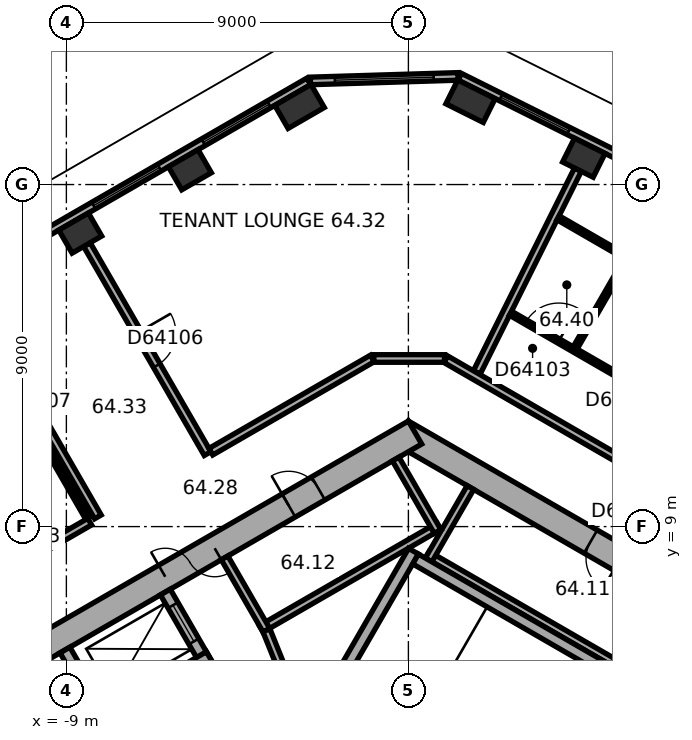
"""IFC4 building model, lengths in metres.
Left out: names, types, materials, properties, quantities, classifications, styles, units other than length and angle.
Written with IfcOpenShell. Run it as: python <this file> out.ifc"""

import sys

from ifc_helpers import new_model, si_unit, direction, frame, frame_2d, origin, origin_2d, place, context, subcontext, project, spatial, rectangle, extrude, element, fill, save


model = new_model("IFC4")
c1 = context("Model", 3, precision=1e-05, world=origin(), true_north=direction((0.0, 1.0)))
c2 = subcontext(c1, "Body", "Model", "MODEL_VIEW")
j1 = project(units=[si_unit("LENGTHUNIT", "METRE"), si_unit("PLANEANGLEUNIT", "RADIAN")], contexts=[c1])
p1 = place(None, origin())
s1 = spatial("IfcSite", under=j1, at=p1, CompositionType="ELEMENT")
p2 = place(p1, origin())
s2 = spatial("IfcBuilding", under=s1, at=p2, CompositionType="ELEMENT")
p3 = place(p2, frame((0.0, 0.0, 259.8)))
s3 = spatial("IfcBuildingStorey", under=s2, at=p3, CompositionType="ELEMENT", Elevation=259.8)
p4 = place(p3, frame((4.616, 18.706, 0.0), z_axis=(0.0, 0.0, 1.0), x_axis=(-0.894934361602, 0.44619781311, 0.0)))
e1 = element("IfcColumn", 1, at=p4, inside=s3, PredefinedType="COLUMN", context=c2, shape_type="SweptSolid", body=[
    extrude(rectangle(XDim=0.9, YDim=0.7, at=origin_2d()), origin(), (0.0, 0.0, 1.0), 3.7),
])
for number, where, z_axis, x_axis in (
    (2, (1.635, 20.192, 0.0), (0.0, 0.0, 1.0), (-0.895, 0.446, 0.0)),
    (3, (-2.864, 20.055, 0.0), (0.0, 0.0, 1.0), (-0.866, -0.5, 0.0)),
):
    element("IfcColumn", number, at=place(p3, frame(where, z_axis=z_axis, x_axis=x_axis)), inside=s3, PredefinedType="COLUMN", context=c2, shape_type="SweptSolid", body=[
        extrude(rectangle(XDim=1.1, YDim=0.7, at=origin_2d()), origin(), (0.0, 0.0, 1.0), 3.7),
    ])
for number, where, z_axis, x_axis in (
    (4, (-5.75, 18.389, 0.0), (0.0, 0.0, 1.0), (-0.866, -0.5, 0.0)),
    (5, (-8.635, 16.723, 0.0), (0.0, 0.0, 1.0), (-0.866, -0.5, 0.0)),
):
    element("IfcColumn", number, at=place(p3, frame(where, z_axis=z_axis, x_axis=x_axis)), inside=s3, PredefinedType="COLUMN", context=c2, shape_type="SweptSolid", body=[
        extrude(rectangle(XDim=0.9, YDim=0.7, at=origin_2d()), origin(), (0.0, 0.0, 1.0), 3.7),
    ])
p5 = place(p3, frame((10.025, 5.586, 0.0), z_axis=(0.0, 0.0, 1.0), x_axis=(-0.866026453023, 0.499998182661, 0.0)))
e6 = element("IfcWall", 6, at=p5, inside=s3, PredefinedType="SHEAR", context=c2, shape_type="SweptSolid", body=[
    extrude(rectangle(XDim=11.778, YDim=0.7, at=frame_2d((5.889, 0.0))), origin(), (0.0, 0.0, 1.0), 3.7),
])
p6 = place(p5, frame((5.139, 0.0, 0.0)))
e7 = element("IfcOpeningElement", 7, at=p6, cuts=e6, PredefinedType="OPENING", context=c2, shape_type="SweptSolid", body=[
    extrude(rectangle(XDim=0.9, YDim=2.1, at=frame_2d((0.45, 1.05))), frame((0.0, 0.36, 0.0), z_axis=(0.0, -1.0, 0.0), x_axis=(1.0, 0.0, 0.0)), (0.0, 0.0, 1.0), 0.72),
])
p7 = place(p3, frame((0.175, 11.475, 0.0), z_axis=(0.0, 0.0, 1.0), x_axis=(-0.866026453023, -0.499998182661, 0.0)))
e8 = element("IfcWall", 8, at=p7, inside=s3, PredefinedType="SHEAR", context=c2, shape_type="SweptSolid", body=[
    extrude(rectangle(XDim=11.778, YDim=0.7, at=frame_2d((5.889, 0.0))), origin(), (0.0, 0.0, 1.0), 3.7),
])
p8 = place(p7, frame((6.089, 0.0, 0.0)))
e9 = element("IfcOpeningElement", 9, at=p8, cuts=e8, PredefinedType="OPENING", context=c2, shape_type="SweptSolid", body=[
    extrude(rectangle(XDim=1.5, YDim=2.1, at=frame_2d((0.75, 1.05))), frame((0.0, 0.36, 0.0), z_axis=(0.0, -1.0, 0.0), x_axis=(1.0, 0.0, 0.0)), (0.0, 0.0, 1.0), 0.72),
])
p9 = place(p7, frame((2.939, 0.0, 0.0)))
e10 = element("IfcOpeningElement", 10, at=p9, cuts=e8, PredefinedType="OPENING", context=c2, shape_type="SweptSolid", body=[
    extrude(rectangle(XDim=0.9, YDim=2.1, at=frame_2d((0.45, 1.05))), frame((0.0, 0.36, 0.0), z_axis=(0.0, -1.0, 0.0), x_axis=(1.0, 0.0, 0.0)), (0.0, 0.0, 1.0), 0.72),
])
p10 = place(p3, frame((17.223, 12.923, 0.0), z_axis=(0.0, 0.0, 1.0), x_axis=(-0.894930561148, 0.44620543556, 0.0)))
e11 = element("IfcWall", 11, at=p10, inside=s3, PredefinedType="STANDARD", context=c2, shape_type="SweptSolid", body=[
    extrude(rectangle(XDim=17.731, YDim=0.2, at=frame_2d((8.866, 0.0))), origin(), (0.0, 0.0, 1.0), 3.7),
])
p11 = place(p10, frame((1.202, 0.0, 0.9)))
e12 = element("IfcOpeningElement", 12, at=p11, cuts=e11, PredefinedType="OPENING", context=c2, shape_type="SweptSolid", body=[
    extrude(rectangle(XDim=2.0, YDim=2.0, at=frame_2d((1.0, 1.0))), frame((0.0, 0.11, 0.0), z_axis=(0.0, -1.0, 0.0), x_axis=(1.0, 0.0, 0.0)), (0.0, 0.0, 1.0), 0.22),
])
p12 = place(p10, frame((4.533, 0.0, 0.9)))
e13 = element("IfcOpeningElement", 13, at=p12, cuts=e11, PredefinedType="OPENING", context=c2, shape_type="SweptSolid", body=[
    extrude(rectangle(XDim=2.0, YDim=2.0, at=frame_2d((1.0, 1.0))), frame((0.0, 0.11, 0.0), z_axis=(0.0, -1.0, 0.0), x_axis=(1.0, 0.0, 0.0)), (0.0, 0.0, 1.0), 0.22),
])
p13 = place(p10, frame((7.865, 0.0, 0.9)))
e14 = element("IfcOpeningElement", 14, at=p13, cuts=e11, PredefinedType="OPENING", context=c2, shape_type="SweptSolid", body=[
    extrude(rectangle(XDim=2.0, YDim=2.0, at=frame_2d((1.0, 1.0))), frame((0.0, 0.11, 0.0), z_axis=(0.0, -1.0, 0.0), x_axis=(1.0, 0.0, 0.0)), (0.0, 0.0, 1.0), 0.22),
])
p14 = place(p10, frame((11.197, 0.0, 0.9)))
e15 = element("IfcOpeningElement", 15, at=p14, cuts=e11, PredefinedType="OPENING", context=c2, shape_type="SweptSolid", body=[
    extrude(rectangle(XDim=2.0, YDim=2.0, at=frame_2d((1.0, 1.0))), frame((0.0, 0.11, 0.0), z_axis=(0.0, -1.0, 0.0), x_axis=(1.0, 0.0, 0.0)), (0.0, 0.0, 1.0), 0.22),
])
p15 = place(p10, frame((14.528, 0.0, 0.9)))
e16 = element("IfcOpeningElement", 16, at=p15, cuts=e11, PredefinedType="OPENING", context=c2, shape_type="SweptSolid", body=[
    extrude(rectangle(XDim=2.0, YDim=2.0, at=frame_2d((1.0, 1.0))), frame((0.0, 0.11, 0.0), z_axis=(0.0, -1.0, 0.0), x_axis=(1.0, 0.0, 0.0)), (0.0, 0.0, 1.0), 0.22),
])
p16 = place(p3, frame((1.307, 20.845, 0.0), z_axis=(0.0, 0.0, 1.0), x_axis=(-0.999533654813, -0.030536419175, 0.0)))
e17 = element("IfcWall", 17, at=p16, inside=s3, PredefinedType="STANDARD", context=c2, shape_type="SweptSolid", body=[
    extrude(rectangle(XDim=3.885, YDim=0.2, at=frame_2d((1.943, 0.0))), origin(), (0.0, 0.0, 1.0), 3.7),
])
p17 = place(p16, frame((0.643, 0.0, 0.9)))
e18 = element("IfcOpeningElement", 18, at=p17, cuts=e17, PredefinedType="OPENING", context=c2, shape_type="SweptSolid", body=[
    extrude(rectangle(XDim=2.6, YDim=2.0, at=frame_2d((1.3, 1.0))), frame((0.0, 0.11, 0.0), z_axis=(0.0, -1.0, 0.0), x_axis=(1.0, 0.0, 0.0)), (0.0, 0.0, 1.0), 0.22),
])
p18 = place(p3, frame((-2.624, 20.713, 0.0), z_axis=(0.0, 0.0, 1.0), x_axis=(-0.866026460444, -0.499998169808, 0.0)))
e19 = element("IfcWall", 19, at=p18, inside=s3, PredefinedType="STANDARD", context=c2, shape_type="SweptSolid", body=[
    extrude(rectangle(XDim=17.731, YDim=0.2, at=frame_2d((8.866, 0.0))), origin(), (0.0, 0.0, 1.0), 3.7),
])
p19 = place(p18, frame((1.203, 0.0, 0.9)))
e20 = element("IfcOpeningElement", 20, at=p19, cuts=e19, PredefinedType="OPENING", context=c2, shape_type="SweptSolid", body=[
    extrude(rectangle(XDim=2.0, YDim=2.0, at=frame_2d((1.0, 1.0))), frame((0.0, 0.11, 0.0), z_axis=(0.0, -1.0, 0.0), x_axis=(1.0, 0.0, 0.0)), (0.0, 0.0, 1.0), 0.22),
])
p20 = place(p18, frame((4.535, 0.0, 0.9)))
e21 = element("IfcOpeningElement", 21, at=p20, cuts=e19, PredefinedType="OPENING", context=c2, shape_type="SweptSolid", body=[
    extrude(rectangle(XDim=2.0, YDim=2.0, at=frame_2d((1.0, 1.0))), frame((0.0, 0.11, 0.0), z_axis=(0.0, -1.0, 0.0), x_axis=(1.0, 0.0, 0.0)), (0.0, 0.0, 1.0), 0.22),
])
p21 = place(p18, frame((7.867, 0.0, 0.9)))
e22 = element("IfcOpeningElement", 22, at=p21, cuts=e19, PredefinedType="OPENING", context=c2, shape_type="SweptSolid", body=[
    extrude(rectangle(XDim=2.0, YDim=2.0, at=frame_2d((1.0, 1.0))), frame((0.0, 0.11, 0.0), z_axis=(0.0, -1.0, 0.0), x_axis=(1.0, 0.0, 0.0)), (0.0, 0.0, 1.0), 0.22),
])
p22 = place(p18, frame((11.198, 0.0, 0.9)))
e23 = element("IfcOpeningElement", 23, at=p22, cuts=e19, PredefinedType="OPENING", context=c2, shape_type="SweptSolid", body=[
    extrude(rectangle(XDim=2.0, YDim=2.0, at=frame_2d((1.0, 1.0))), frame((0.0, 0.11, 0.0), z_axis=(0.0, -1.0, 0.0), x_axis=(1.0, 0.0, 0.0)), (0.0, 0.0, 1.0), 0.22),
])
p23 = place(p18, frame((14.53, 0.0, 0.9)))
e24 = element("IfcOpeningElement", 24, at=p23, cuts=e19, PredefinedType="OPENING", context=c2, shape_type="SweptSolid", body=[
    extrude(rectangle(XDim=2.0, YDim=2.0, at=frame_2d((1.0, 1.0))), frame((0.0, 0.11, 0.0), z_axis=(0.0, -1.0, 0.0), x_axis=(1.0, 0.0, 0.0)), (0.0, 0.0, 1.0), 0.22),
])
p24 = place(p3, frame((7.424, 4.259, 0.0), z_axis=(0.0, 0.0, 1.0), x_axis=(-0.866026010844, 0.49999894854, 0.0)))
e25 = element("IfcWall", 25, at=p24, inside=s3, PredefinedType="PARTITIONING", context=c2, shape_type="SweptSolid", body=[
    extrude(rectangle(XDim=8.0, YDim=0.2, at=frame_2d((4.0, 0.0))), origin(), (0.0, 0.0, 1.0), 3.42),
])
p25 = place(p3, frame((0.532, 8.122, 0.0), z_axis=(0.0, 0.0, 1.0), x_axis=(0.500077893725, 0.86598042715, 0.0)))
e26 = element("IfcWall", 26, at=p25, inside=s3, PredefinedType="PARTITIONING", context=c2, shape_type="SweptSolid", body=[
    extrude(rectangle(XDim=2.2, YDim=0.2, at=frame_2d((1.1, 0.0))), origin(), (0.0, 0.0, 1.0), 3.42),
])
p26 = place(p3, frame((0.803, 9.009, 0.0), z_axis=(0.0, 0.0, 1.0), x_axis=(-0.866028230842, -0.499995103361, 0.0)))
e27 = element("IfcWall", 27, at=p26, inside=s3, PredefinedType="PARTITIONING", context=c2, shape_type="SweptSolid", body=[
    extrude(rectangle(XDim=5.4, YDim=0.2, at=frame_2d((2.7, 0.0))), origin(), (0.0, 0.0, 1.0), 3.42),
])
p27 = place(p3, frame((0.767, 8.872, 0.0), z_axis=(0.0, 0.0, 1.0), x_axis=(-0.499994660107, 0.866028486751, 0.0)))
e28 = element("IfcWall", 28, at=p27, inside=s3, PredefinedType="PARTITIONING", context=c2, shape_type="SweptSolid", body=[
    extrude(rectangle(XDim=2.2, YDim=0.2, at=frame_2d((1.1, 0.0))), origin(), (0.0, 0.0, 1.0), 3.42),
])
p28 = place(p3, frame((-3.737, 6.272, 0.0), z_axis=(0.0, 0.0, 1.0), x_axis=(-0.50002983664, 0.866008176907, 0.0)))
e29 = element("IfcWall", 29, at=p28, inside=s3, PredefinedType="PARTITIONING", context=c2, shape_type="SweptSolid", body=[
    extrude(rectangle(XDim=2.2, YDim=0.2, at=frame_2d((1.1, 0.0))), origin(), (0.0, 0.0, 1.0), 3.42),
])
p29 = place(p3, frame((-2.216, 4.282, 0.0), z_axis=(0.0, 0.0, 1.0), x_axis=(0.499977259774, 0.866038532462, 0.0)))
e30 = element("IfcWall", 30, at=p29, inside=s3, PredefinedType="SHEAR", context=c2, shape_type="SweptSolid", body=[
    extrude(rectangle(XDim=4.7, YDim=0.3, at=frame_2d((2.35, 0.0))), origin(), (0.0, 0.0, 1.0), 3.42),
])
p30 = place(p3, frame((6.303, 4.617, 0.0), z_axis=(0.0, 0.0, 1.0), x_axis=(-0.866027801685, 0.499995846692, 0.0)))
e31 = element("IfcWall", 31, at=p30, inside=s3, PredefinedType="SHEAR", context=c2, shape_type="SweptSolid", body=[
    extrude(rectangle(XDim=7.06, YDim=0.3, at=frame_2d((3.53, 0.0))), origin(), (0.0, 0.0, 1.0), 3.42),
])
p31 = place(p3, frame((-5.295, 5.372, 0.0), z_axis=(0.0, 0.0, 1.0), x_axis=(-0.500077893725, 0.86598042715, 0.0)))
e32 = element("IfcWall", 32, at=p31, inside=s3, PredefinedType="SHEAR", context=c2, shape_type="SweptSolid", body=[
    extrude(rectangle(XDim=2.2, YDim=0.3, at=frame_2d((1.1, 0.0))), origin(), (0.0, 0.0, 1.0), 3.42),
])
p32 = place(p31, frame((0.7, 0.0, 0.0)))
e33 = element("IfcOpeningElement", 33, at=p32, cuts=e32, PredefinedType="OPENING", context=c2, shape_type="SweptSolid", body=[
    extrude(rectangle(XDim=1.1, YDim=2.1, at=frame_2d((0.55, 1.05))), frame((0.0, 0.16, 0.0), z_axis=(0.0, -1.0, 0.0), x_axis=(1.0, 0.0, 0.0)), (0.0, 0.0, 1.0), 0.32),
])
p33 = place(p3, frame((-5.24, 5.577, 0.0), z_axis=(0.0, 0.0, 1.0), x_axis=(-0.866014461049, -0.500018952895, 0.0)))
e34 = element("IfcWall", 34, at=p33, inside=s3, PredefinedType="SHEAR", context=c2, shape_type="SweptSolid", body=[
    extrude(rectangle(XDim=3.35, YDim=0.3, at=frame_2d((1.675, 0.0))), origin(), (0.0, 0.0, 1.0), 3.42),
])
p34 = place(p3, frame((-7.937, 3.847, 0.0), z_axis=(0.0, 0.0, 1.0), x_axis=(-0.50002983664, 0.866008176907, 0.0)))
e35 = element("IfcWall", 35, at=p34, inside=s3, PredefinedType="SHEAR", context=c2, shape_type="SweptSolid", body=[
    extrude(rectangle(XDim=2.2, YDim=0.3, at=frame_2d((1.1, 0.0))), origin(), (0.0, 0.0, 1.0), 3.42),
])
p35 = place(p3, frame((-2.615, 3.487, 0.0), z_axis=(0.0, 0.0, 1.0), x_axis=(-0.373576831041, 0.92759924068, 0.0)))
e36 = element("IfcWall", 36, at=p35, inside=s3, PredefinedType="PARTITIONING", context=c2, shape_type="SweptSolid", body=[
    extrude(rectangle(XDim=3.002, YDim=0.2, at=frame_2d((1.501, 0.0))), origin(), (0.0, 0.0, 1.0), 3.42),
])
p36 = place(p35, frame((1.15, 0.0, 0.0)))
e37 = element("IfcOpeningElement", 37, at=p36, cuts=e36, PredefinedType="OPENING", context=c2, shape_type="SweptSolid", body=[
    extrude(rectangle(XDim=0.9, YDim=2.1, at=frame_2d((0.45, 1.05))), frame((0.0, 0.11, 0.0), z_axis=(0.0, -1.0, 0.0), x_axis=(1.0, 0.0, 0.0)), (0.0, 0.0, 1.0), 0.22),
])
p37 = place(p3, frame((-11.345, 14.754, 0.0), z_axis=(0.0, 0.0, 1.0), x_axis=(0.500005339912, -0.866022320763, 0.0)))
e38 = element("IfcWall", 38, at=p37, inside=s3, PredefinedType="PARTITIONING", context=c2, shape_type="SweptSolid", body=[
    extrude(rectangle(XDim=6.35, YDim=0.2, at=frame_2d((3.175, 0.0))), origin(), (0.0, 0.0, 1.0), 3.42),
])
p38 = place(p37, frame((2.675, 0.0, 0.0)))
e39 = element("IfcOpeningElement", 39, at=p38, cuts=e38, PredefinedType="OPENING", context=c2, shape_type="SweptSolid", body=[
    extrude(rectangle(XDim=1.0, YDim=2.1, at=frame_2d((0.5, 1.05))), frame((0.0, 0.11, 0.0), z_axis=(0.0, -1.0, 0.0), x_axis=(1.0, 0.0, 0.0)), (0.0, 0.0, 1.0), 0.22),
])
p39 = place(p3, frame((-9.557, 11.156, 0.0), z_axis=(0.0, 0.0, 1.0), x_axis=(0.49994888933, -0.866054910533, 0.0)))
e40 = element("IfcWall", 40, at=p39, inside=s3, PredefinedType="PARTITIONING", context=c2, shape_type="SweptSolid", body=[
    extrude(rectangle(XDim=2.24, YDim=0.12, at=frame_2d((1.12, 0.0))), origin(), (0.0, 0.0, 1.0), 3.42),
])
p40 = place(p3, frame((-8.46, 16.42, 0.0), z_axis=(0.0, 0.0, 1.0), x_axis=(0.500005339912, -0.866022320763, 0.0)))
e41 = element("IfcWall", 41, at=p40, inside=s3, PredefinedType="PARTITIONING", context=c2, shape_type="SweptSolid", body=[
    extrude(rectangle(XDim=6.35, YDim=0.2, at=frame_2d((3.175, 0.0))), origin(), (0.0, 0.0, 1.0), 2.87),
])
p41 = place(p40, frame((2.675, 0.0, 0.0)))
e42 = element("IfcOpeningElement", 42, at=p41, cuts=e41, PredefinedType="OPENING", context=c2, shape_type="SweptSolid", body=[
    extrude(rectangle(XDim=1.0, YDim=2.1, at=frame_2d((0.5, 1.05))), frame((0.0, 0.11, 0.0), z_axis=(0.0, -1.0, 0.0), x_axis=(1.0, 0.0, 0.0)), (0.0, 0.0, 1.0), 0.22),
])
p42 = place(p3, frame((-8.387, 9.13, 0.0), z_axis=(0.0, 0.0, 1.0), x_axis=(-0.866026878644, -0.499997445459, 0.0)))
e43 = element("IfcWall", 43, at=p42, inside=s3, PredefinedType="PARTITIONING", context=c2, shape_type="SweptSolid", body=[
    extrude(rectangle(XDim=3.151, YDim=0.2, at=frame_2d((1.575, 0.0))), origin(), (0.0, 0.0, 1.0), 3.42),
])
p43 = place(p3, frame((-0.95, 13.423, 0.0), z_axis=(0.0, 0.0, 1.0), x_axis=(-0.86603557629, -0.499982380289, 0.0)))
e44 = element("IfcWall", 44, at=p43, inside=s3, PredefinedType="PARTITIONING", context=c2, shape_type="SweptSolid", body=[
    extrude(rectangle(XDim=4.906, YDim=0.2, at=frame_2d((2.453, 0.0))), origin(), (0.0, 0.0, 1.0), 3.42),
])
p44 = place(p3, frame((0.95, 13.423, 0.0), z_axis=(0.0, 0.0, 1.0), x_axis=(-1.0, 0.0, 0.0)))
e45 = element("IfcWall", 45, at=p44, inside=s3, PredefinedType="PARTITIONING", context=c2, shape_type="SweptSolid", body=[
    extrude(rectangle(XDim=1.86, YDim=0.2, at=frame_2d((0.93, 0.0))), origin(), (0.0, 0.0, 1.0), 3.42),
])
p45 = place(p3, frame((4.388, 13.702, 0.0), z_axis=(0.0, 0.0, 1.0), x_axis=(0.500048966069, 0.865997131366, 0.0)))
e46 = element("IfcWall", 46, at=p45, inside=s3, PredefinedType="PARTITIONING", context=c2, shape_type="SweptSolid", body=[
    extrude(rectangle(XDim=2.74, YDim=0.12, at=frame_2d((1.37, 0.0))), origin(), (0.0, 0.0, 1.0), 3.42),
])
p46 = place(p3, frame((4.46, 18.392, 0.0), z_axis=(0.0, 0.0, 1.0), x_axis=(-0.446197360024, -0.894934587502, 0.0)))
e47 = element("IfcWall", 47, at=p46, inside=s3, PredefinedType="PARTITIONING", context=c2, shape_type="SweptSolid", body=[
    extrude(rectangle(XDim=5.96, YDim=0.2, at=frame_2d((2.98, 0.0))), origin(), (0.0, 0.0, 1.0), 2.87),
])
p47 = place(p3, frame((5.706, 16.104, 0.0), z_axis=(0.0, 0.0, 1.0), x_axis=(-0.866040114423, 0.499974519561, 0.0)))
e48 = element("IfcWall", 48, at=p47, inside=s3, PredefinedType="PARTITIONING", context=c2, shape_type="SweptSolid", body=[
    extrude(rectangle(XDim=2.04, YDim=0.12, at=frame_2d((1.02, 0.0))), origin(), (0.0, 0.0, 1.0), 3.42),
])
p48 = place(p3, frame((11.15, 7.534, 0.0), z_axis=(0.0, 0.0, 1.0), x_axis=(-0.866026603062, 0.499997922785, 0.0)))
e49 = element("IfcWall", 49, at=p48, inside=s3, PredefinedType="PARTITIONING", context=c2, shape_type="SweptSolid", body=[
    extrude(rectangle(XDim=11.738, YDim=0.2, at=frame_2d((5.869, 0.0))), origin(), (0.0, 0.0, 1.0), 3.42),
])
p49 = place(p48, frame((5.345, 0.0, 0.0)))
e50 = element("IfcOpeningElement", 50, at=p49, cuts=e49, PredefinedType="OPENING", context=c2, shape_type="SweptSolid", body=[
    extrude(rectangle(XDim=1.0, YDim=2.1, at=frame_2d((0.5, 1.05))), frame((0.0, 0.11, 0.0), z_axis=(0.0, -1.0, 0.0), x_axis=(1.0, 0.0, 0.0)), (0.0, 0.0, 1.0), 0.22),
])
p50 = place(p3, frame((11.187, 9.707, 0.0), z_axis=(0.0, 0.0, 1.0), x_axis=(-0.866033133531, 0.499986611447, 0.0)))
e51 = element("IfcWall", 51, at=p50, inside=s3, PredefinedType="PARTITIONING", context=c2, shape_type="SweptSolid", body=[
    extrude(rectangle(XDim=9.814, YDim=0.12, at=frame_2d((4.907, 0.0))), origin(), (0.0, 0.0, 1.0), 3.42),
])
p51 = place(p50, frame((8.349, 0.0, 0.0)))
e52 = element("IfcOpeningElement", 52, at=p51, cuts=e51, PredefinedType="OPENING", context=c2, shape_type="SweptSolid", body=[
    extrude(rectangle(XDim=1.0, YDim=2.1, at=frame_2d((0.5, 1.05))), frame((0.0, 0.07, 0.0), z_axis=(0.0, -1.0, 0.0), x_axis=(1.0, 0.0, 0.0)), (0.0, 0.0, 1.0), 0.14),
])
p52 = place(p50, frame((1.7, 0.0, 0.0)))
e53 = element("IfcOpeningElement", 53, at=p52, cuts=e51, PredefinedType="OPENING", context=c2, shape_type="SweptSolid", body=[
    extrude(rectangle(XDim=0.9, YDim=2.1, at=frame_2d((0.45, 1.05))), frame((0.0, 0.07, 0.0), z_axis=(0.0, -1.0, 0.0), x_axis=(1.0, 0.0, 0.0)), (0.0, 0.0, 1.0), 0.14),
])
p53 = place(p50, frame((5.642, 0.0, 0.0)))
e54 = element("IfcOpeningElement", 54, at=p53, cuts=e51, PredefinedType="OPENING", context=c2, shape_type="SweptSolid", body=[
    extrude(rectangle(XDim=0.9, YDim=2.1, at=frame_2d((0.45, 1.05))), frame((0.0, 0.07, 0.0), z_axis=(0.0, -1.0, 0.0), x_axis=(1.0, 0.0, 0.0)), (0.0, 0.0, 1.0), 0.14),
])
p54 = place(p15, origin())
e55 = element("IfcWindow", 55, at=p54, inside=s3, PartitioningType="SINGLE_PANEL", PredefinedType="WINDOW", context=c2, shape_type="SweptSolid", body=[
    extrude(rectangle(XDim=2.0, YDim=2.0, at=frame_2d((1.0, 1.0))), frame((0.0, 0.03, 0.0), z_axis=(0.0, -1.0, 0.0), x_axis=(1.0, 0.0, 0.0)), (0.0, 0.0, 1.0), 0.06),
])
fill(e16, e55)
p55 = place(p17, origin())
e56 = element("IfcWindow", 56, at=p55, inside=s3, PartitioningType="SINGLE_PANEL", PredefinedType="WINDOW", context=c2, shape_type="SweptSolid", body=[
    extrude(rectangle(XDim=2.6, YDim=2.0, at=frame_2d((1.3, 1.0))), frame((0.0, 0.03, 0.0), z_axis=(0.0, -1.0, 0.0), x_axis=(1.0, 0.0, 0.0)), (0.0, 0.0, 1.0), 0.06),
])
fill(e18, e56)
p56 = place(p19, origin())
e57 = element("IfcWindow", 57, at=p56, inside=s3, PartitioningType="SINGLE_PANEL", PredefinedType="WINDOW", context=c2, shape_type="SweptSolid", body=[
    extrude(rectangle(XDim=2.0, YDim=2.0, at=frame_2d((1.0, 1.0))), frame((0.0, 0.03, 0.0), z_axis=(0.0, -1.0, 0.0), x_axis=(1.0, 0.0, 0.0)), (0.0, 0.0, 1.0), 0.06),
])
fill(e20, e57)
p57 = place(p20, origin())
e58 = element("IfcWindow", 58, at=p57, inside=s3, PartitioningType="SINGLE_PANEL", PredefinedType="WINDOW", context=c2, shape_type="SweptSolid", body=[
    extrude(rectangle(XDim=2.0, YDim=2.0, at=frame_2d((1.0, 1.0))), frame((0.0, 0.03, 0.0), z_axis=(0.0, -1.0, 0.0), x_axis=(1.0, 0.0, 0.0)), (0.0, 0.0, 1.0), 0.06),
])
fill(e21, e58)
p58 = place(p8, origin())
e59 = element("IfcDoor", 59, at=p58, inside=s3, OperationType="DOUBLE_DOOR_SINGLE_SWING", PredefinedType="DOOR", context=c2, shape_type="SweptSolid", body=[
    extrude(rectangle(XDim=1.5, YDim=2.1, at=frame_2d((0.75, 1.05))), frame((0.0, 0.025, 0.0), z_axis=(0.0, -1.0, 0.0), x_axis=(1.0, 0.0, 0.0)), (0.0, 0.0, 1.0), 0.05),
])
fill(e9, e59)
p59 = place(p6, origin())
e60 = element("IfcDoor", 60, at=p59, inside=s3, OperationType="SINGLE_SWING_LEFT", PredefinedType="DOOR", context=c2, shape_type="SweptSolid", body=[
    extrude(rectangle(XDim=0.9, YDim=2.1, at=frame_2d((0.45, 1.05))), frame((0.0, 0.025, 0.0), z_axis=(0.0, -1.0, 0.0), x_axis=(1.0, 0.0, 0.0)), (0.0, 0.0, 1.0), 0.05),
])
fill(e7, e60)
p60 = place(p9, origin())
e61 = element("IfcDoor", 61, at=p60, inside=s3, OperationType="SINGLE_SWING_LEFT", PredefinedType="DOOR", context=c2, shape_type="SweptSolid", body=[
    extrude(rectangle(XDim=0.9, YDim=2.1, at=frame_2d((0.45, 1.05))), frame((0.0, 0.025, 0.0), z_axis=(0.0, -1.0, 0.0), x_axis=(1.0, 0.0, 0.0)), (0.0, 0.0, 1.0), 0.05),
])
fill(e10, e61)
p61 = place(p32, origin())
e62 = element("IfcDoor", 62, at=p61, inside=s3, OperationType="DOUBLE_DOOR_SLIDING", PredefinedType="DOOR", context=c2, shape_type="SweptSolid", body=[
    extrude(rectangle(XDim=1.1, YDim=2.1, at=frame_2d((0.55, 1.05))), frame((0.0, 0.025, 0.0), z_axis=(0.0, -1.0, 0.0), x_axis=(1.0, 0.0, 0.0)), (0.0, 0.0, 1.0), 0.05),
])
fill(e33, e62)
p62 = place(p51, origin())
e63 = element("IfcDoor", 63, at=p62, inside=s3, OperationType="SINGLE_SWING_LEFT", PredefinedType="DOOR", context=c2, shape_type="SweptSolid", body=[
    extrude(rectangle(XDim=1.0, YDim=2.1, at=frame_2d((0.5, 1.05))), frame((0.0, 0.025, 0.0), z_axis=(0.0, -1.0, 0.0), x_axis=(1.0, 0.0, 0.0)), (0.0, 0.0, 1.0), 0.05),
])
fill(e52, e63)
p63 = place(p41, origin())
e64 = element("IfcDoor", 64, at=p63, inside=s3, OperationType="SINGLE_SWING_LEFT", PredefinedType="DOOR", context=c2, shape_type="SweptSolid", body=[
    extrude(rectangle(XDim=1.0, YDim=2.1, at=frame_2d((0.5, 1.05))), frame((0.0, 0.025, 0.0), z_axis=(0.0, -1.0, 0.0), x_axis=(1.0, 0.0, 0.0)), (0.0, 0.0, 1.0), 0.05),
])
fill(e42, e64)
save(model, sys.argv[1])
